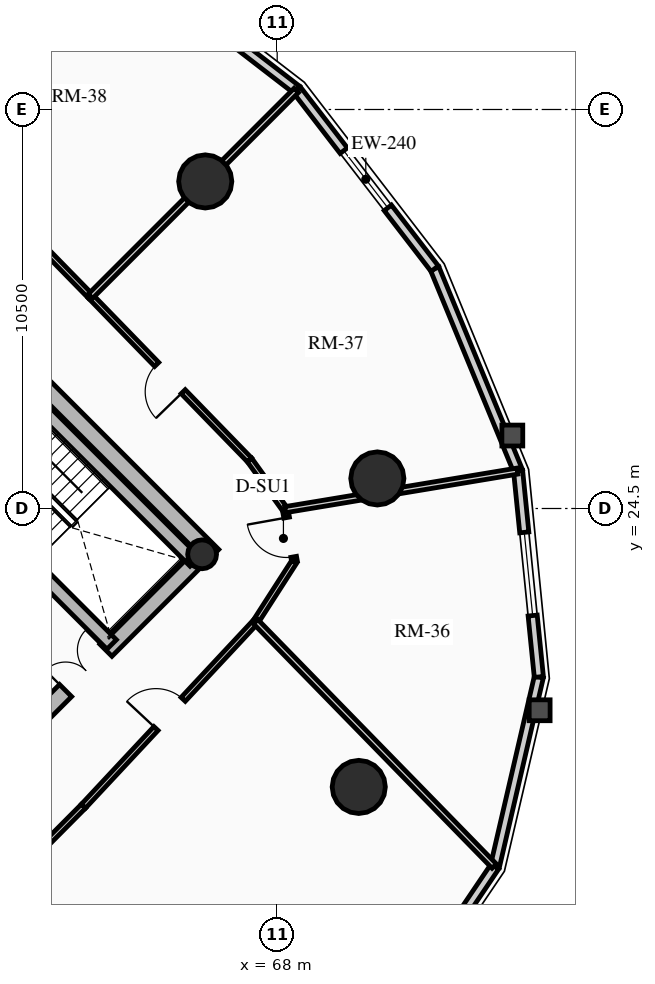
"""IFC4 building model, lengths in metres.
Left out: names, types, materials, properties, quantities, classifications, styles, units other than length and angle.
Written with IfcOpenShell. Run it as: python <this file> out.ifc"""

import sys

from ifc_helpers import new_model, si_unit, direction, frame, frame_2d, origin, origin_2d, place, context, subcontext, project, spatial, rectangle, circle, hollow_circle, extrude, source, transform, mapped, element, fill, save


model = new_model("IFC4")
c1 = context("Model", 3, precision=1e-05, world=origin(), true_north=direction((0.0, 1.0)))
c2 = subcontext(c1, "Body", "Model", "MODEL_VIEW")
j1 = project(units=[si_unit("LENGTHUNIT", "METRE"), si_unit("PLANEANGLEUNIT", "RADIAN")], contexts=[c1])
p1 = place(None, origin())
s1 = spatial("IfcSite", under=j1, at=p1, CompositionType="ELEMENT")
p2 = place(p1, origin())
s2 = spatial("IfcBuilding", under=s1, at=p2, CompositionType="ELEMENT")
p3 = place(p2, frame((0.0, 0.0, 81.79)))
s3 = spatial("IfcBuildingStorey", under=s2, at=p3, CompositionType="ELEMENT", Elevation=81.79)
p4 = place(p3, frame((66.303, 23.263, 0.0), z_axis=(0.0, 0.0, 1.0), x_axis=(-0.707106781187, 0.707106781187, 0.0)))
e1 = element("IfcWall", 1, at=p4, inside=s3, PredefinedType="SHEAR", context=c2, shape_type="SweptSolid", body=[
    extrude(rectangle(XDim=14.2, YDim=0.45, at=frame_2d((7.1, 0.0))), origin(), (0.0, 0.0, 1.0), 2.91),
])
p5 = place(p3, frame((58.578, 15.856, 0.0), z_axis=(0.0, 0.0, 1.0), x_axis=(0.707106781187, 0.707106781187, 0.0)))
e2 = element("IfcWall", 2, at=p5, inside=s3, PredefinedType="SHEAR", context=c2, shape_type="SweptSolid", body=[
    extrude(rectangle(XDim=10.7, YDim=0.45, at=frame_2d((5.35, 0.0))), origin(), (0.0, 0.0, 1.0), 2.91),
])
m1 = source(origin(), c2, "Body", "SweptSolid", [
    extrude(rectangle(XDim=1.5, YDim=2.02, at=frame_2d((0.75, 1.01))), frame((0.0, 0.235, 0.0), z_axis=(0.0, -1.0, 0.0), x_axis=(1.0, 0.0, 0.0)), (0.0, 0.0, 1.0), 0.47),
])
p6 = place(p5, frame((5.45, 0.0, 0.0)))
e3 = element("IfcOpeningElement", 3, at=p6, cuts=e2, PredefinedType="OPENING", context=c2, shape_type="MappedRepresentation", body=[
    mapped(m1, transform((0.0, 0.0, 0.0), x_axis=(1.0, 0.0, 0.0), y_axis=(0.0, 1.0, 0.0), z_axis=(0.0, 0.0, 1.0), scale=1.0)),
])
p7 = place(p3, frame((63.645, 20.922, 0.0), z_axis=(0.0, 0.0, 1.0), x_axis=(-0.707106781187, 0.707106781187, 0.0)))
e4 = element("IfcWall", 4, at=p7, inside=s3, PredefinedType="SHEAR", context=c2, shape_type="SweptSolid", body=[
    extrude(rectangle(XDim=13.75, YDim=0.35, at=frame_2d((6.875, 0.0))), origin(), (0.0, 0.0, 1.0), 2.91),
])
m2 = source(origin(), c2, "Body", "SweptSolid", [
    extrude(rectangle(XDim=1.1, YDim=2.015, at=frame_2d((0.55, 1.007))), frame((0.0, 0.185, 0.0), z_axis=(0.0, -1.0, 0.0), x_axis=(1.0, 0.0, 0.0)), (0.0, 0.0, 1.0), 0.37),
])
p8 = place(p7, frame((10.0, 0.0, 0.0)))
e5 = element("IfcOpeningElement", 5, at=p8, cuts=e4, PredefinedType="OPENING", context=c2, shape_type="MappedRepresentation", body=[
    mapped(m2, transform((0.0, 0.0, 0.0), x_axis=(1.0, 0.0, 0.0), y_axis=(0.0, 1.0, 0.0), z_axis=(0.0, 0.0, 1.0), scale=1.0)),
])
p9 = place(p7, frame((12.0, 0.0, 0.0)))
e6 = element("IfcOpeningElement", 6, at=p9, cuts=e4, PredefinedType="OPENING", context=c2, shape_type="MappedRepresentation", body=[
    mapped(m2, transform((0.0, 0.0, 0.0), x_axis=(1.0, 0.0, 0.0), y_axis=(0.0, 1.0, 0.0), z_axis=(0.0, 0.0, 1.0), scale=1.0)),
])
m3 = source(origin(), c2, "Body", "SweptSolid", [
    extrude(rectangle(XDim=1.15, YDim=2.02, at=frame_2d((0.575, 1.01))), frame((0.0, 0.185, 0.0), z_axis=(0.0, -1.0, 0.0), x_axis=(1.0, 0.0, 0.0)), (0.0, 0.0, 1.0), 0.37),
])
p10 = place(p7, frame((5.305, 0.0, 0.0)))
e7 = element("IfcOpeningElement", 7, at=p10, cuts=e4, PredefinedType="OPENING", context=c2, shape_type="MappedRepresentation", body=[
    mapped(m3, transform((0.0, 0.0, 0.0), x_axis=(1.0, 0.0, 0.0), y_axis=(0.0, 1.0, 0.0), z_axis=(0.0, 0.0, 1.0), scale=1.0)),
])
p11 = place(p3, frame((65.83, 23.107, 0.0), z_axis=(0.0, 0.0, 1.0), x_axis=(-0.707088616009, 0.707124945897, 0.0)))
e8 = element("IfcWall", 8, at=p11, inside=s3, PredefinedType="SHEAR", context=c2, shape_type="SweptSolid", body=[
    extrude(rectangle(XDim=6.72, YDim=0.35, at=frame_2d((3.36, 0.0))), origin(), (0.0, 0.0, 1.0), 2.91),
])
p12 = place(p3, frame((66.024, 23.294, 0.0), z_axis=(0.0, 0.0, 1.0), x_axis=(0.707106781187, 0.707106781187, 0.0)))
e9 = element("IfcColumn", 9, at=p12, inside=s3, PredefinedType="COLUMN", context=c2, shape_type="SweptSolid", body=[
    extrude(hollow_circle(Radius=0.38, WallThickness=0.032, at=origin_2d()), origin(), (0.0, 0.0, 1.0), 2.91),
])
for number, where, z_axis, x_axis in (
    (10, (66.107, 33.107, 0.0), (0.0, 0.0, 1.0), (1.0, 0.0, 0.0)),
    (11, (70.146, 17.173, 0.0), (0.0, 0.0, 1.0), (1.0, 0.0, 0.0)),
    (12, (70.635, 25.291, 0.0), (0.0, 0.0, 1.0), (1.0, 0.0, 0.0)),
):
    element("IfcColumn", number, at=place(p3, frame(where, z_axis=z_axis, x_axis=x_axis)), inside=s3, PredefinedType="USERDEFINED", context=c2, shape_type="SweptSolid", body=[
        extrude(circle(Radius=0.7, at=origin_2d()), origin(), (0.0, 0.0, 1.0), 2.91),
    ])
p13 = place(p3, frame((63.811, 39.145, 0.0), z_axis=(0.0, 0.0, 1.0), x_axis=(0.791982052206, -0.61054437102, 0.0)))
e13 = element("IfcWall", 13, at=p13, inside=s3, PredefinedType="SOLIDWALL", context=c2, shape_type="SweptSolid", body=[
    extrude(rectangle(XDim=5.942, YDim=0.24, at=frame_2d((2.971, 0.0))), origin(), (0.0, 0.0, 1.0), 2.179),
])
p14 = place(p3, frame((73.729, 15.08, 0.0), z_axis=(0.0, 0.0, 1.0), x_axis=(-0.559572880421, -0.828781148131, 0.0)))
e14 = element("IfcWall", 14, at=p14, inside=s3, PredefinedType="SOLIDWALL", context=c2, shape_type="SweptSolid", body=[
    extrude(rectangle(XDim=4.905, YDim=0.24, at=frame_2d((2.452, 0.0))), origin(), (0.0, 0.0, 1.0), 2.179),
])
m4 = source(origin(), c2, "Body", "SweptSolid", [
    extrude(rectangle(XDim=1.9, YDim=1.35, at=frame_2d((0.95, 0.675))), frame((0.0, 0.13, 0.0), z_axis=(0.0, -1.0, 0.0), x_axis=(1.0, 0.0, 0.0)), (0.0, 0.0, 1.0), 0.26),
])
p15 = place(p14, frame((1.502, 0.0, 0.65)))
e15 = element("IfcOpeningElement", 15, at=p15, cuts=e14, PredefinedType="OPENING", context=c2, shape_type="MappedRepresentation", body=[
    mapped(m4, transform((0.0, 0.0, 0.0), x_axis=(1.0, 0.0, 0.0), y_axis=(0.0, 1.0, 0.0), z_axis=(0.0, 0.0, 1.0), scale=1.0)),
])
p16 = place(p3, frame((74.885, 20.067, 0.0), z_axis=(0.0, 0.0, 1.0), x_axis=(-0.225834725257, -0.974165631126, 0.0)))
e16 = element("IfcWall", 16, at=p16, inside=s3, PredefinedType="SOLIDWALL", context=c2, shape_type="SweptSolid", body=[
    extrude(rectangle(XDim=5.119, YDim=0.24, at=frame_2d((2.56, 0.0))), origin(), (0.0, 0.0, 1.0), 2.179),
])
p17 = place(p3, frame((74.339, 25.487, 0.0), z_axis=(0.0, 0.0, 1.0), x_axis=(0.10015591906, -0.994971754311, 0.0)))
e17 = element("IfcWall", 17, at=p17, inside=s3, PredefinedType="SOLIDWALL", context=c2, shape_type="SweptSolid", body=[
    extrude(rectangle(XDim=5.448, YDim=0.24, at=frame_2d((2.724, 0.0))), origin(), (0.0, 0.0, 1.0), 2.179),
])
m5 = source(origin(), c2, "Body", "SweptSolid", [
    extrude(rectangle(XDim=2.2, YDim=1.35, at=frame_2d((1.1, 0.675))), frame((0.0, 0.13, 0.0), z_axis=(0.0, -1.0, 0.0), x_axis=(1.0, 0.0, 0.0)), (0.0, 0.0, 1.0), 0.26),
])
p18 = place(p17, frame((1.624, 0.0, 0.65)))
e18 = element("IfcOpeningElement", 18, at=p18, cuts=e17, PredefinedType="OPENING", context=c2, shape_type="MappedRepresentation", body=[
    mapped(m5, transform((0.0, 0.0, 0.0), x_axis=(1.0, 0.0, 0.0), y_axis=(0.0, 1.0, 0.0), z_axis=(0.0, 0.0, 1.0), scale=1.0)),
])
p19 = place(p3, frame((72.145, 30.811, 0.0), z_axis=(0.0, 0.0, 1.0), x_axis=(0.381027003055, -0.924563909604, 0.0)))
e19 = element("IfcWall", 19, at=p19, inside=s3, PredefinedType="SOLIDWALL", context=c2, shape_type="SweptSolid", body=[
    extrude(rectangle(XDim=5.758, YDim=0.24, at=frame_2d((2.879, 0.0))), origin(), (0.0, 0.0, 1.0), 2.179),
])
p20 = place(p3, frame((68.517, 35.517, 0.0), z_axis=(0.0, 0.0, 1.0), x_axis=(0.61054437102, -0.791982052206, 0.0)))
e20 = element("IfcWall", 20, at=p20, inside=s3, PredefinedType="SOLIDWALL", context=c2, shape_type="SweptSolid", body=[
    extrude(rectangle(XDim=5.942, YDim=0.24, at=frame_2d((2.971, 0.0))), origin(), (0.0, 0.0, 1.0), 2.179),
])
p21 = place(p20, frame((2.021, 0.0, 0.65)))
e21 = element("IfcOpeningElement", 21, at=p21, cuts=e20, PredefinedType="OPENING", context=c2, shape_type="MappedRepresentation", body=[
    mapped(m4, transform((0.0, 0.0, 0.0), x_axis=(1.0, 0.0, 0.0), y_axis=(0.0, 1.0, 0.0), z_axis=(0.0, 0.0, 1.0), scale=1.0)),
])
p22 = place(p3, frame((63.086, 30.086, 0.0), z_axis=(0.0, 0.0, 1.0), x_axis=(-0.699075897379, 0.715047473741, 0.0)))
e22 = element("IfcWall", 22, at=p22, inside=s3, PredefinedType="PARTITIONING", context=c2, shape_type="SweptSolid", body=[
    extrude(rectangle(XDim=6.114, YDim=0.15, at=frame_2d((3.057, 0.0))), origin(), (0.0, 0.0, 1.0), 2.225),
])
p23 = place(p3, frame((60.562, 14.31, 0.0), z_axis=(0.0, 0.0, 1.0), x_axis=(0.704566236161, 0.709638230975, 0.0)))
e23 = element("IfcWall", 23, at=p23, inside=s3, PredefinedType="PARTITIONING", context=c2, shape_type="SweptSolid", body=[
    extrude(rectangle(XDim=3.321, YDim=0.15, at=frame_2d((1.661, 0.0))), origin(), (0.0, 0.0, 1.0), 2.225),
])
p24 = place(p3, frame((62.903, 16.667, 0.0), z_axis=(0.0, 0.0, 1.0), x_axis=(0.682371947497, 0.731005147225, 0.0)))
e24 = element("IfcWall", 24, at=p24, inside=s3, PredefinedType="PARTITIONING", context=c2, shape_type="SweptSolid", body=[
    extrude(rectangle(XDim=6.642, YDim=0.15, at=frame_2d((3.321, 0.0))), origin(), (0.0, 0.0, 1.0), 2.225),
])
m6 = source(origin(), c2, "Body", "SweptSolid", [
    extrude(rectangle(XDim=1.05, YDim=2.015, at=frame_2d((0.525, 1.007))), frame((0.0, 0.085, 0.0), z_axis=(0.0, -1.0, 0.0), x_axis=(1.0, 0.0, 0.0)), (0.0, 0.0, 1.0), 0.17),
])
p25 = place(p24, frame((2.796, 0.0, 0.0)))
e25 = element("IfcOpeningElement", 25, at=p25, cuts=e24, PredefinedType="OPENING", context=c2, shape_type="MappedRepresentation", body=[
    mapped(m6, transform((0.0, 0.0, 0.0), x_axis=(1.0, 0.0, 0.0), y_axis=(0.0, 1.0, 0.0), z_axis=(0.0, 0.0, 1.0), scale=1.0)),
])
p26 = place(p3, frame((67.435, 21.521, 0.0), z_axis=(0.0, 0.0, 1.0), x_axis=(0.540777197838, 0.841165870859, 0.0)))
e26 = element("IfcWall", 26, at=p26, inside=s3, PredefinedType="PARTITIONING", context=c2, shape_type="SweptSolid", body=[
    extrude(rectangle(XDim=1.888, YDim=0.15, at=frame_2d((0.944, 0.0))), origin(), (0.0, 0.0, 1.0), 2.225),
])
p27 = place(p3, frame((68.456, 23.11, 0.0), z_axis=(0.0, 0.0, 1.0), x_axis=(-0.1772522795, 0.984165448191, 0.0)))
e27 = element("IfcWall", 27, at=p27, inside=s3, PredefinedType="PARTITIONING", context=c2, shape_type="SweptSolid", body=[
    extrude(rectangle(XDim=1.382, YDim=0.15, at=frame_2d((0.691, 0.0))), origin(), (0.0, 0.0, 1.0), 2.225),
])
p28 = place(p27, frame((0.12, 0.0, 0.0)))
e28 = element("IfcOpeningElement", 28, at=p28, cuts=e27, PredefinedType="OPENING", context=c2, shape_type="MappedRepresentation", body=[
    mapped(m6, transform((0.0, 0.0, 0.0), x_axis=(1.0, 0.0, 0.0), y_axis=(0.0, 1.0, 0.0), z_axis=(0.0, 0.0, 1.0), scale=1.0)),
])
p29 = place(p3, frame((68.211, 24.469, 0.0), z_axis=(0.0, 0.0, 1.0), x_axis=(-0.583012141368, 0.812463441034, 0.0)))
e29 = element("IfcWall", 29, at=p29, inside=s3, PredefinedType="PARTITIONING", context=c2, shape_type="SweptSolid", body=[
    extrude(rectangle(XDim=1.613, YDim=0.15, at=frame_2d((0.807, 0.0))), origin(), (0.0, 0.0, 1.0), 2.225),
])
p30 = place(p3, frame((67.27, 25.78, 0.0), z_axis=(0.0, 0.0, 1.0), x_axis=(-0.696847842907, 0.717218992942, 0.0)))
e30 = element("IfcWall", 30, at=p30, inside=s3, PredefinedType="PARTITIONING", context=c2, shape_type="SweptSolid", body=[
    extrude(rectangle(XDim=6.004, YDim=0.15, at=frame_2d((3.002, 0.0))), origin(), (0.0, 0.0, 1.0), 2.655),
])
m7 = source(origin(), c2, "Body", "SweptSolid", [
    extrude(rectangle(XDim=1.0, YDim=2.015, at=frame_2d((0.5, 1.007))), frame((0.0, 0.085, 0.0), z_axis=(0.0, -1.0, 0.0), x_axis=(1.0, 0.0, 0.0)), (0.0, 0.0, 1.0), 0.17),
])
p31 = place(p30, frame((2.502, 0.0, 0.0)))
e31 = element("IfcOpeningElement", 31, at=p31, cuts=e30, PredefinedType="OPENING", context=c2, shape_type="MappedRepresentation", body=[
    mapped(m7, transform((0.0, 0.0, 0.0), x_axis=(1.0, 0.0, 0.0), y_axis=(0.0, 1.0, 0.0), z_axis=(0.0, 0.0, 1.0), scale=1.0)),
])
p32 = place(p3, frame((63.086, 30.086, 0.0), z_axis=(0.0, 0.0, 1.0), x_axis=(0.707106781187, 0.707106781187, 0.0)))
e32 = element("IfcWall", 32, at=p32, inside=s3, PredefinedType="PARTITIONING", context=c2, shape_type="SweptSolid", body=[
    extrude(rectangle(XDim=7.661, YDim=0.16, at=frame_2d((3.831, 0.0))), origin(), (0.0, 0.0, 1.0), 2.179),
])
p33 = place(p3, frame((60.562, 14.31, 0.0), z_axis=(0.0, 0.0, 1.0), x_axis=(0.725582293335, -0.688135404989, 0.0)))
e33 = element("IfcWall", 33, at=p33, inside=s3, PredefinedType="PARTITIONING", context=c2, shape_type="SweptSolid", body=[
    extrude(rectangle(XDim=8.749, YDim=0.16, at=frame_2d((4.375, 0.0))), origin(), (0.0, 0.0, 1.0), 2.179),
])
p34 = place(p3, frame((67.435, 21.521, 0.0), z_axis=(0.0, 0.0, 1.0), x_axis=(0.6983880073, -0.715719352302, 0.0)))
e34 = element("IfcWall", 34, at=p34, inside=s3, PredefinedType="PARTITIONING", context=c2, shape_type="SweptSolid", body=[
    extrude(rectangle(XDim=8.987, YDim=0.16, at=frame_2d((4.494, 0.0))), origin(), (0.0, 0.0, 1.0), 2.179),
])
p35 = place(p3, frame((68.211, 24.469, 0.0), z_axis=(0.0, 0.0, 1.0), x_axis=(0.986479033329, 0.163887512651, 0.0)))
e35 = element("IfcWall", 35, at=p35, inside=s3, PredefinedType="PARTITIONING", context=c2, shape_type="SweptSolid", body=[
    extrude(rectangle(XDim=6.193, YDim=0.16, at=frame_2d((3.096, 0.0))), origin(), (0.0, 0.0, 1.0), 2.179),
])
m8 = source(origin(), c2, "Body", "SweptSolid", [
    extrude(rectangle(XDim=2.2, YDim=1.35, at=frame_2d((1.1, 0.675))), frame((0.0, 0.03, 0.0), z_axis=(0.0, -1.0, 0.0), x_axis=(1.0, 0.0, 0.0)), (0.0, 0.0, 1.0), 0.06),
])
p36 = place(p18, origin())
e36 = element("IfcWindow", 36, at=p36, inside=s3, PartitioningType="DOUBLE_PANEL_VERTICAL", PredefinedType="WINDOW", context=c2, shape_type="MappedRepresentation", body=[
    mapped(m8, transform((0.0, 0.0, 0.0), x_axis=(1.0, 0.0, 0.0), y_axis=(0.0, 1.0, 0.0), z_axis=(0.0, 0.0, 1.0), scale=1.0)),
])
fill(e18, e36)
m9 = source(origin(), c2, "Body", "SweptSolid", [
    extrude(rectangle(XDim=1.9, YDim=1.35, at=frame_2d((0.95, 0.675))), frame((0.0, 0.03, 0.0), z_axis=(0.0, -1.0, 0.0), x_axis=(1.0, 0.0, 0.0)), (0.0, 0.0, 1.0), 0.06),
])
p37 = place(p21, origin())
e37 = element("IfcWindow", 37, at=p37, inside=s3, PartitioningType="DOUBLE_PANEL_VERTICAL", PredefinedType="WINDOW", context=c2, shape_type="MappedRepresentation", body=[
    mapped(m9, transform((0.0, 0.0, 0.0), x_axis=(1.0, 0.0, 0.0), y_axis=(0.0, 1.0, 0.0), z_axis=(0.0, 0.0, 1.0), scale=1.0)),
])
fill(e21, e37)
m10 = source(origin(), c2, "Body", "SweptSolid", [
    extrude(rectangle(XDim=1.5, YDim=2.02, at=frame_2d((0.75, 1.01))), frame((0.0, 0.025, 0.0), z_axis=(0.0, -1.0, 0.0), x_axis=(1.0, 0.0, 0.0)), (0.0, 0.0, 1.0), 0.05),
])
p38 = place(p6, origin())
e38 = element("IfcDoor", 38, at=p38, inside=s3, OperationType="DOUBLE_DOOR_SINGLE_SWING", PredefinedType="DOOR", context=c2, shape_type="MappedRepresentation", body=[
    mapped(m10, transform((0.0, 0.0, 0.0), x_axis=(1.0, 0.0, 0.0), y_axis=(0.0, 1.0, 0.0), z_axis=(0.0, 0.0, 1.0), scale=1.0)),
])
fill(e3, e38)
m11 = source(origin(), c2, "Body", "SweptSolid", [
    extrude(rectangle(XDim=1.05, YDim=2.015, at=frame_2d((0.525, 1.007))), frame((0.0, 0.025, 0.0), z_axis=(0.0, -1.0, 0.0), x_axis=(1.0, 0.0, 0.0)), (0.0, 0.0, 1.0), 0.05),
])
p39 = place(p25, origin())
e39 = element("IfcDoor", 39, at=p39, inside=s3, OperationType="SINGLE_SWING_LEFT", PredefinedType="DOOR", context=c2, shape_type="MappedRepresentation", body=[
    mapped(m11, transform((0.0, 0.0, 0.0), x_axis=(1.0, 0.0, 0.0), y_axis=(0.0, 1.0, 0.0), z_axis=(0.0, 0.0, 1.0), scale=1.0)),
])
fill(e25, e39)
p40 = place(p28, origin())
e40 = element("IfcDoor", 40, at=p40, inside=s3, OperationType="SINGLE_SWING_RIGHT", PredefinedType="DOOR", context=c2, shape_type="MappedRepresentation", body=[
    mapped(m11, transform((0.0, 0.0, 0.0), x_axis=(1.0, 0.0, 0.0), y_axis=(0.0, 1.0, 0.0), z_axis=(0.0, 0.0, 1.0), scale=1.0)),
])
fill(e28, e40)
m12 = source(origin(), c2, "Body", "SweptSolid", [
    extrude(rectangle(XDim=1.0, YDim=2.015, at=frame_2d((0.5, 1.007))), frame((0.0, 0.025, 0.0), z_axis=(0.0, -1.0, 0.0), x_axis=(1.0, 0.0, 0.0)), (0.0, 0.0, 1.0), 0.05),
])
p41 = place(p31, origin())
e41 = element("IfcDoor", 41, at=p41, inside=s3, OperationType="SINGLE_SWING_LEFT", PredefinedType="DOOR", context=c2, shape_type="MappedRepresentation", body=[
    mapped(m12, transform((0.0, 0.0, 0.0), x_axis=(1.0, 0.0, 0.0), y_axis=(0.0, 1.0, 0.0), z_axis=(0.0, 0.0, 1.0), scale=1.0)),
])
fill(e31, e41)
save(model, sys.argv[1])
